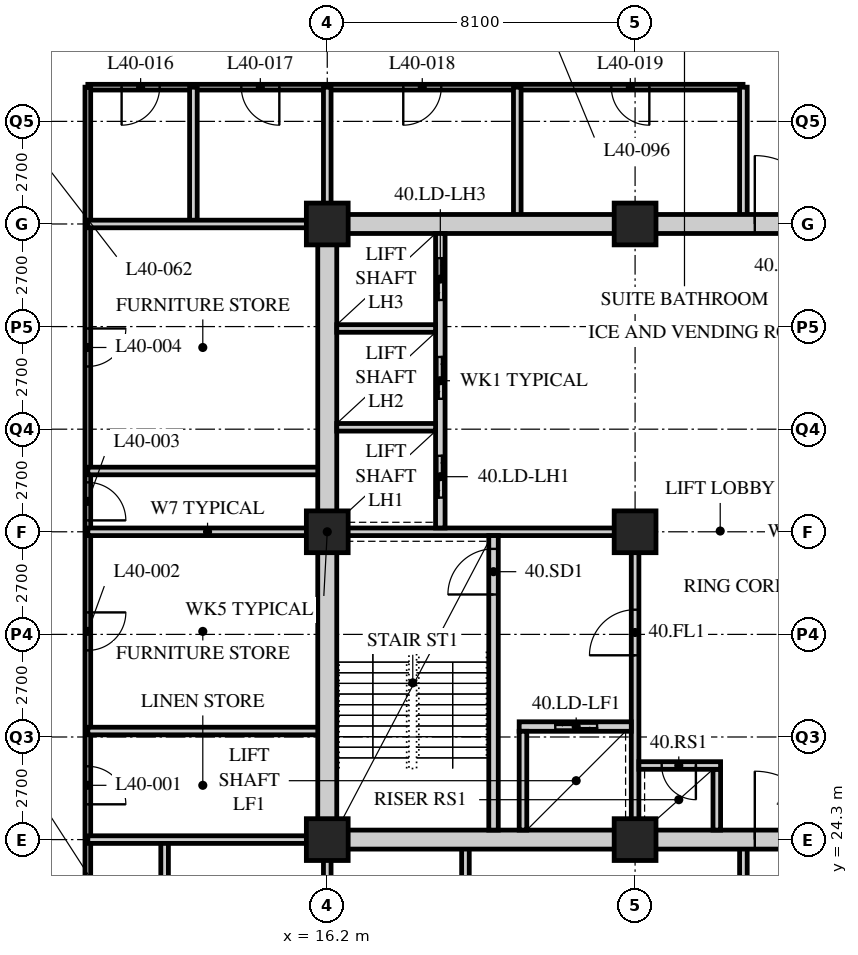
"""IFC4 building model, lengths in metres.
Left out: names, types, materials, properties, quantities, classifications, styles, units other than length and angle.
Written with IfcOpenShell. Run it as: python <this file> out.ifc"""

import sys

from ifc_helpers import new_model, si_unit, direction, frame, frame_2d, origin, origin_2d, place, context, subcontext, project, spatial, rectangle, hollow_rectangle, extrude, element, fill, save


model = new_model("IFC4")
c1 = context("Model", 3, precision=1e-05, world=origin(), true_north=direction((0.0, 1.0)))
c2 = subcontext(c1, "Body", "Model", "MODEL_VIEW")
j1 = project(units=[si_unit("LENGTHUNIT", "METRE"), si_unit("PLANEANGLEUNIT", "RADIAN")], contexts=[c1])
p1 = place(None, origin())
s1 = spatial("IfcSite", under=j1, at=p1, CompositionType="ELEMENT")
p2 = place(p1, origin())
s2 = spatial("IfcBuilding", under=s1, at=p2, CompositionType="ELEMENT")
p3 = place(p2, frame((0.0, 0.0, 154.4)))
s3 = spatial("IfcBuildingStorey", under=s2, at=p3, CompositionType="ELEMENT", Elevation=154.4)
for number, where, z_axis, x_axis in (
    (1, (16.2, 24.3, 0.0), (0.0, 0.0, 1.0), (1.0, 0.0, 0.0)),
    (2, (16.2, 32.4, 0.0), (0.0, 0.0, 1.0), (1.0, 0.0, 0.0)),
    (3, (16.2, 40.5, 0.0), (0.0, 0.0, 1.0), (1.0, 0.0, 0.0)),
    (4, (24.3, 24.3, 0.0), (0.0, 0.0, 1.0), (1.0, 0.0, 0.0)),
    (5, (24.3, 32.4, 0.0), (0.0, 0.0, 1.0), (1.0, 0.0, 0.0)),
    (6, (24.3, 40.5, 0.0), (0.0, 0.0, 1.0), (1.0, 0.0, 0.0)),
):
    element("IfcColumn", number, at=place(p3, frame(where, z_axis=z_axis, x_axis=x_axis)), inside=s3, PredefinedType="COLUMN", context=c2, shape_type="SweptSolid", body=[
        extrude(hollow_rectangle(XDim=1.1, YDim=1.1, WallThickness=0.1, at=origin_2d()), origin(), (0.0, 0.0, 1.0), 3.4),
    ])
p4 = place(p3, frame((27.14, 44.1, 0.0), z_axis=(0.0, 0.0, 1.0), x_axis=(-1.0, 0.0, 0.0)))
e7 = element("IfcWall", 7, at=p4, inside=s3, PredefinedType="PARTITIONING", context=c2, shape_type="SweptSolid", body=[
    extrude(rectangle(XDim=17.24, YDim=0.15, at=frame_2d((8.62, 0.0))), origin(), (0.0, 0.0, 1.0), 3.15),
])
p5 = place(p4, frame((15.351, 0.0, 0.0)))
e8 = element("IfcOpeningElement", 8, at=p5, cuts=e7, PredefinedType="OPENING", context=c2, shape_type="SweptSolid", body=[
    extrude(rectangle(XDim=1.0, YDim=2.1, at=frame_2d((0.5, 1.05))), frame((0.0, 0.085, 0.0), z_axis=(0.0, -1.0, 0.0), x_axis=(1.0, 0.0, 0.0)), (0.0, 0.0, 1.0), 0.17),
])
p6 = place(p4, frame((12.201, 0.0, 0.0)))
e9 = element("IfcOpeningElement", 9, at=p6, cuts=e7, PredefinedType="OPENING", context=c2, shape_type="SweptSolid", body=[
    extrude(rectangle(XDim=1.0, YDim=2.1, at=frame_2d((0.5, 1.05))), frame((0.0, 0.085, 0.0), z_axis=(0.0, -1.0, 0.0), x_axis=(1.0, 0.0, 0.0)), (0.0, 0.0, 1.0), 0.17),
])
p7 = place(p4, frame((7.94, 0.0, 0.0)))
e10 = element("IfcOpeningElement", 10, at=p7, cuts=e7, PredefinedType="OPENING", context=c2, shape_type="SweptSolid", body=[
    extrude(rectangle(XDim=1.0, YDim=2.1, at=frame_2d((0.5, 1.05))), frame((0.0, 0.085, 0.0), z_axis=(0.0, -1.0, 0.0), x_axis=(1.0, 0.0, 0.0)), (0.0, 0.0, 1.0), 0.17),
])
p8 = place(p4, frame((2.465, 0.0, 0.0)))
e11 = element("IfcOpeningElement", 11, at=p8, cuts=e7, PredefinedType="OPENING", context=c2, shape_type="SweptSolid", body=[
    extrude(rectangle(XDim=1.0, YDim=2.1, at=frame_2d((0.5, 1.05))), frame((0.0, 0.085, 0.0), z_axis=(0.0, -1.0, 0.0), x_axis=(1.0, 0.0, 0.0)), (0.0, 0.0, 1.0), 0.17),
])
p9 = place(p3, frame((9.9, 44.1, 0.0), z_axis=(0.0, 0.0, 1.0), x_axis=(0.0, -1.0, 0.0)))
e12 = element("IfcWall", 12, at=p9, inside=s3, PredefinedType="PARTITIONING", context=c2, shape_type="SweptSolid", body=[
    extrude(rectangle(XDim=24.75, YDim=0.15, at=frame_2d((12.375, 0.0))), origin(), (0.0, 0.0, 1.0), 3.15),
])
p10 = place(p9, frame((17.871, 0.0, 0.0)))
e13 = element("IfcOpeningElement", 13, at=p10, cuts=e12, PredefinedType="OPENING", context=c2, shape_type="SweptSolid", body=[
    extrude(rectangle(XDim=1.0, YDim=2.1, at=frame_2d((0.5, 1.05))), frame((0.0, 0.085, 0.0), z_axis=(0.0, -1.0, 0.0), x_axis=(1.0, 0.0, 0.0)), (0.0, 0.0, 1.0), 0.17),
])
p11 = place(p9, frame((13.821, 0.0, 0.0)))
e14 = element("IfcOpeningElement", 14, at=p11, cuts=e12, PredefinedType="OPENING", context=c2, shape_type="SweptSolid", body=[
    extrude(rectangle(XDim=1.0, YDim=2.1, at=frame_2d((0.5, 1.05))), frame((0.0, 0.085, 0.0), z_axis=(0.0, -1.0, 0.0), x_axis=(1.0, 0.0, 0.0)), (0.0, 0.0, 1.0), 0.17),
])
p12 = place(p9, frame((10.4, 0.0, 0.0)))
e15 = element("IfcOpeningElement", 15, at=p12, cuts=e12, PredefinedType="OPENING", context=c2, shape_type="SweptSolid", body=[
    extrude(rectangle(XDim=1.0, YDim=2.1, at=frame_2d((0.5, 1.05))), frame((0.0, 0.085, 0.0), z_axis=(0.0, -1.0, 0.0), x_axis=(1.0, 0.0, 0.0)), (0.0, 0.0, 1.0), 0.17),
])
p13 = place(p9, frame((6.35, 0.0, 0.0)))
e16 = element("IfcOpeningElement", 16, at=p13, cuts=e12, PredefinedType="OPENING", context=c2, shape_type="SweptSolid", body=[
    extrude(rectangle(XDim=1.0, YDim=2.1, at=frame_2d((0.5, 1.05))), frame((0.0, 0.085, 0.0), z_axis=(0.0, -1.0, 0.0), x_axis=(1.0, 0.0, 0.0)), (0.0, 0.0, 1.0), 0.17),
])
for number, where, z_axis, x_axis in (
    (17, (9.9, 32.4, 0.0), (0.0, 0.0, 1.0), (1.0, 0.0, 0.0)),
    (18, (9.9, 27.157, 0.0), (0.0, 0.0, 1.0), (1.0, 0.0, 0.0)),
    (19, (9.9, 34.0, 0.0), (0.0, 0.0, 1.0), (1.0, 0.0, 0.0)),
):
    element("IfcWall", number, at=place(p3, frame(where, z_axis=z_axis, x_axis=x_axis)), inside=s3, PredefinedType="SOLIDWALL", context=c2, shape_type="SweptSolid", body=[
        extrude(rectangle(XDim=6.3, YDim=0.2, at=frame_2d((3.15, 0.0))), origin(), (0.0, 0.0, 1.0), 3.15),
    ])
p14 = place(p3, frame((16.2, 19.35, 0.0), z_axis=(0.0, 0.0, 1.0), x_axis=(0.0, 1.0, 0.0)))
e20 = element("IfcWall", 20, at=p14, inside=s3, PredefinedType="SOLIDWALL", context=c2, shape_type="SweptSolid", body=[
    extrude(rectangle(XDim=4.95, YDim=0.2, at=frame_2d((2.475, 0.0))), origin(), (0.0, 0.0, 1.0), 2.15),
])
for number, where, z_axis, x_axis in (
    (21, (11.92, 19.35, 0.0), (0.0, 0.0, 1.0), (0.0, 1.0, 0.0)),
    (22, (19.836, 19.35, 0.0), (0.0, 0.0, 1.0), (0.0, 1.0, 0.0)),
    (23, (27.15, 19.35, 0.0), (0.0, 0.0, 1.0), (0.0, 1.0, 0.0)),
):
    element("IfcWall", number, at=place(p3, frame(where, z_axis=z_axis, x_axis=x_axis)), inside=s3, PredefinedType="SOLIDWALL", context=c2, shape_type="SweptSolid", body=[
        extrude(rectangle(XDim=4.95, YDim=0.2, at=frame_2d((2.475, 0.0))), origin(), (0.0, 0.0, 1.0), 3.15),
    ])
p15 = place(p3, frame((16.2, 40.5, 0.0), z_axis=(0.0, 0.0, 1.0), x_axis=(0.0, 1.0, 0.0)))
e24 = element("IfcWall", 24, at=p15, inside=s3, PredefinedType="SOLIDWALL", context=c2, shape_type="SweptSolid", body=[
    extrude(rectangle(XDim=3.6, YDim=0.2, at=frame_2d((1.8, 0.0))), origin(), (0.0, 0.0, 1.0), 2.15),
])
for number, where, z_axis, x_axis in (
    (25, (12.678, 44.1, 0.0), (0.0, 0.0, 1.0), (0.0, -1.0, 0.0)),
    (26, (21.2, 44.1, 0.0), (0.0, 0.0, 1.0), (0.0, -1.0, 0.0)),
    (27, (27.15, 40.5, 0.0), (0.0, 0.0, 1.0), (0.0, 1.0, 0.0)),
):
    element("IfcWall", number, at=place(p3, frame(where, z_axis=z_axis, x_axis=x_axis)), inside=s3, PredefinedType="SOLIDWALL", context=c2, shape_type="SweptSolid", body=[
        extrude(rectangle(XDim=3.6, YDim=0.2, at=frame_2d((1.8, 0.0))), origin(), (0.0, 0.0, 1.0), 3.15),
    ])
for number, where, z_axis, x_axis in (
    (28, (9.9, 24.3, 0.0), (0.0, 0.0, 1.0), (1.0, 0.0, 0.0)),
    (29, (9.9, 40.5, 0.0), (0.0, 0.0, 1.0), (1.0, 0.0, 0.0)),
):
    element("IfcWall", number, at=place(p3, frame(where, z_axis=z_axis, x_axis=x_axis)), inside=s3, PredefinedType="SOLIDWALL", context=c2, shape_type="SweptSolid", body=[
        extrude(rectangle(XDim=6.3, YDim=0.2, at=frame_2d((3.15, 0.0))), origin(), (0.0, 0.0, 1.0), 3.15),
    ])
p16 = place(p3, frame((15.95, 24.3, 0.0), z_axis=(0.0, 0.0, 1.0), x_axis=(1.0, 0.0, 0.0)))
e30 = element("IfcWall", 30, at=p16, inside=s3, PredefinedType="SOLIDWALL", context=c2, shape_type="SweptSolid", body=[
    extrude(rectangle(XDim=8.35, YDim=0.5, at=frame_2d((4.175, 0.0))), origin(), (0.0, 0.0, 1.0), 2.38),
])
p17 = place(p3, frame((24.3, 24.3, 0.0), z_axis=(0.0, 0.0, 1.0), x_axis=(1.0, 0.0, 0.0)))
e31 = element("IfcWall", 31, at=p17, inside=s3, PredefinedType="SOLIDWALL", context=c2, shape_type="SweptSolid", body=[
    extrude(rectangle(XDim=8.1, YDim=0.5, at=frame_2d((4.05, 0.0))), origin(), (0.0, 0.0, 1.0), 2.5),
])
p18 = place(p17, frame((3.15, 0.0, 0.0)))
e32 = element("IfcOpeningElement", 32, at=p18, cuts=e31, PredefinedType="OPENING", context=c2, shape_type="SweptSolid", body=[
    extrude(rectangle(XDim=1.8, YDim=2.4, at=frame_2d((0.9, 1.2))), frame((0.0, 0.26, 0.0), z_axis=(0.0, -1.0, 0.0), x_axis=(1.0, 0.0, 0.0)), (0.0, 0.0, 1.0), 0.52),
])
p19 = place(p3, frame((15.95, 40.5, 0.0), z_axis=(0.0, 0.0, 1.0), x_axis=(1.0, 0.0, 0.0)))
e33 = element("IfcWall", 33, at=p19, inside=s3, PredefinedType="SOLIDWALL", context=c2, shape_type="SweptSolid", body=[
    extrude(rectangle(XDim=8.35, YDim=0.5, at=frame_2d((4.175, 0.0))), origin(), (0.0, 0.0, 1.0), 2.38),
])
p20 = place(p3, frame((24.3, 40.5, 0.0), z_axis=(0.0, 0.0, 1.0), x_axis=(1.0, 0.0, 0.0)))
e34 = element("IfcWall", 34, at=p20, inside=s3, PredefinedType="SOLIDWALL", context=c2, shape_type="SweptSolid", body=[
    extrude(rectangle(XDim=8.1, YDim=0.5, at=frame_2d((4.05, 0.0))), origin(), (0.0, 0.0, 1.0), 2.5),
])
p21 = place(p20, frame((3.15, 0.0, 0.0)))
e35 = element("IfcOpeningElement", 35, at=p21, cuts=e34, PredefinedType="OPENING", context=c2, shape_type="SweptSolid", body=[
    extrude(rectangle(XDim=1.8, YDim=2.4, at=frame_2d((0.9, 1.2))), frame((0.0, 0.26, 0.0), z_axis=(0.0, -1.0, 0.0), x_axis=(1.0, 0.0, 0.0)), (0.0, 0.0, 1.0), 0.52),
])
p22 = place(p3, frame((16.2, 24.55, 0.0), z_axis=(0.0, 0.0, 1.0), x_axis=(0.0, 1.0, 0.0)))
e36 = element("IfcWall", 36, at=p22, inside=s3, PredefinedType="SOLIDWALL", context=c2, shape_type="SweptSolid", body=[
    extrude(rectangle(XDim=15.7, YDim=0.5, at=frame_2d((7.85, 0.0))), origin(), (0.0, 0.0, 1.0), 2.15),
])
p23 = place(p3, frame((16.45, 32.4, 0.0), z_axis=(0.0, 0.0, 1.0), x_axis=(1.0, 0.0, 0.0)))
e37 = element("IfcWall", 37, at=p23, inside=s3, PredefinedType="SOLIDWALL", context=c2, shape_type="SweptSolid", body=[
    extrude(rectangle(XDim=7.95, YDim=0.2, at=frame_2d((3.975, 0.0))), origin(), (0.0, 0.0, 1.0), 2.388),
])
p24 = place(p3, frame((24.3, 24.55, 0.0), z_axis=(0.0, 0.0, 1.0), x_axis=(0.0, 1.0, 0.0)))
e38 = element("IfcWall", 38, at=p24, inside=s3, PredefinedType="SOLIDWALL", context=c2, shape_type="SweptSolid", body=[
    extrude(rectangle(XDim=7.75, YDim=0.2, at=frame_2d((3.875, 0.0))), origin(), (0.0, 0.0, 1.0), 2.388),
])
p25 = place(p24, frame((4.6, 0.0, 0.0)))
e39 = element("IfcOpeningElement", 39, at=p25, cuts=e38, PredefinedType="OPENING", context=c2, shape_type="SweptSolid", body=[
    extrude(rectangle(XDim=1.2, YDim=2.1, at=frame_2d((0.6, 1.05))), frame((0.0, 0.11, 0.0), z_axis=(0.0, -1.0, 0.0), x_axis=(1.0, 0.0, 0.0)), (0.0, 0.0, 1.0), 0.22),
])
p26 = place(p3, frame((20.575, 24.55, 0.0), z_axis=(0.0, 0.0, 1.0), x_axis=(0.0, 1.0, 0.0)))
e40 = element("IfcWall", 40, at=p26, inside=s3, PredefinedType="SOLIDWALL", context=c2, shape_type="SweptSolid", body=[
    extrude(rectangle(XDim=7.75, YDim=0.25, at=frame_2d((3.875, 0.0))), origin(), (0.0, 0.0, 1.0), 3.15),
])
p27 = place(p26, frame((6.2, 0.0, 0.0)))
e41 = element("IfcOpeningElement", 41, at=p27, cuts=e40, PredefinedType="OPENING", context=c2, shape_type="SweptSolid", body=[
    extrude(rectangle(XDim=1.2, YDim=2.1, at=frame_2d((0.6, 1.05))), frame((0.0, 0.135, 0.0), z_axis=(0.0, -1.0, 0.0), x_axis=(1.0, 0.0, 0.0)), (0.0, 0.0, 1.0), 0.27),
])
p28 = place(p3, frame((21.25, 27.275, 0.0), z_axis=(0.0, 0.0, 1.0), x_axis=(1.0, 0.0, 0.0)))
e42 = element("IfcWall", 42, at=p28, inside=s3, PredefinedType="SOLIDWALL", context=c2, shape_type="SweptSolid", body=[
    extrude(rectangle(XDim=2.95, YDim=0.25, at=frame_2d((1.475, 0.0))), origin(), (0.0, 0.0, 1.0), 3.15),
])
p29 = place(p28, frame((0.95, 0.0, 0.0)))
e43 = element("IfcOpeningElement", 43, at=p29, cuts=e42, PredefinedType="OPENING", context=c2, shape_type="SweptSolid", body=[
    extrude(rectangle(XDim=1.1, YDim=2.4, at=frame_2d((0.55, 1.2))), frame((0.0, 0.135, 0.0), z_axis=(0.0, -1.0, 0.0), x_axis=(1.0, 0.0, 0.0)), (0.0, 0.0, 1.0), 0.27),
])
p30 = place(p3, frame((21.35, 24.55, 0.0), z_axis=(0.0, 0.0, 1.0), x_axis=(0.0, 1.0, 0.0)))
e44 = element("IfcWall", 44, at=p30, inside=s3, PredefinedType="SOLIDWALL", context=c2, shape_type="SweptSolid", body=[
    extrude(rectangle(XDim=2.6, YDim=0.2, at=frame_2d((1.3, 0.0))), origin(), (0.0, 0.0, 1.0), 3.15),
])
p31 = place(p3, frame((19.175, 32.5, 0.0), z_axis=(0.0, 0.0, 1.0), x_axis=(0.0, 1.0, 0.0)))
e45 = element("IfcWall", 45, at=p31, inside=s3, PredefinedType="SOLIDWALL", context=c2, shape_type="SweptSolid", body=[
    extrude(rectangle(XDim=7.75, YDim=0.25, at=frame_2d((3.875, 0.0))), origin(), (0.0, 0.0, 1.0), 3.15),
])
p32 = place(p31, frame((0.8, 0.0, 0.0)))
e46 = element("IfcOpeningElement", 46, at=p32, cuts=e45, PredefinedType="OPENING", context=c2, shape_type="SweptSolid", body=[
    extrude(rectangle(XDim=1.1, YDim=2.4, at=frame_2d((0.55, 1.2))), frame((0.0, 0.135, 0.0), z_axis=(0.0, -1.0, 0.0), x_axis=(1.0, 0.0, 0.0)), (0.0, 0.0, 1.0), 0.27),
])
p33 = place(p31, frame((3.4, 0.0, 0.0)))
e47 = element("IfcOpeningElement", 47, at=p33, cuts=e45, PredefinedType="OPENING", context=c2, shape_type="SweptSolid", body=[
    extrude(rectangle(XDim=1.1, YDim=2.4, at=frame_2d((0.55, 1.2))), frame((0.0, 0.135, 0.0), z_axis=(0.0, -1.0, 0.0), x_axis=(1.0, 0.0, 0.0)), (0.0, 0.0, 1.0), 0.27),
])
p34 = place(p31, frame((6.0, 0.0, 0.0)))
e48 = element("IfcOpeningElement", 48, at=p34, cuts=e45, PredefinedType="OPENING", context=c2, shape_type="SweptSolid", body=[
    extrude(rectangle(XDim=1.1, YDim=2.4, at=frame_2d((0.55, 1.2))), frame((0.0, 0.135, 0.0), z_axis=(0.0, -1.0, 0.0), x_axis=(1.0, 0.0, 0.0)), (0.0, 0.0, 1.0), 0.27),
])
for number, where, z_axis, x_axis in (
    (49, (16.45, 35.15, 0.0), (0.0, 0.0, 1.0), (1.0, 0.0, 0.0)),
    (50, (16.45, 37.75, 0.0), (0.0, 0.0, 1.0), (1.0, 0.0, 0.0)),
):
    element("IfcWall", number, at=place(p3, frame(where, z_axis=z_axis, x_axis=x_axis)), inside=s3, PredefinedType="SOLIDWALL", context=c2, shape_type="SweptSolid", body=[
        extrude(rectangle(XDim=2.6, YDim=0.2, at=frame_2d((1.3, 0.0))), origin(), (0.0, 0.0, 1.0), 3.15),
    ])
p35 = place(p3, frame((26.45, 24.55, 0.0), z_axis=(0.0, 0.0, 1.0), x_axis=(0.0, 1.0, 0.0)))
e51 = element("IfcWall", 51, at=p35, inside=s3, PredefinedType="SOLIDWALL", context=c2, shape_type="SweptSolid", body=[
    extrude(rectangle(XDim=1.6, YDim=0.2, at=frame_2d((0.8, 0.0))), origin(), (0.0, 0.0, 1.0), 3.15),
])
p36 = place(p3, frame((24.4, 26.25, 0.0), z_axis=(0.0, 0.0, 1.0), x_axis=(1.0, 0.0, 0.0)))
e52 = element("IfcWall", 52, at=p36, inside=s3, PredefinedType="SOLIDWALL", context=c2, shape_type="SweptSolid", body=[
    extrude(rectangle(XDim=2.15, YDim=0.2, at=frame_2d((1.075, 0.0))), origin(), (0.0, 0.0, 1.0), 3.15),
])
p37 = place(p36, frame((0.6, 0.0, 0.0)))
e53 = element("IfcOpeningElement", 53, at=p37, cuts=e52, PredefinedType="OPENING", context=c2, shape_type="SweptSolid", body=[
    extrude(rectangle(XDim=0.9, YDim=2.1, at=frame_2d((0.45, 1.05))), frame((0.0, 0.11, 0.0), z_axis=(0.0, -1.0, 0.0), x_axis=(1.0, 0.0, 0.0)), (0.0, 0.0, 1.0), 0.22),
])
p38 = place(p10, origin())
e54 = element("IfcDoor", 54, at=p38, inside=s3, OperationType="SINGLE_SWING_RIGHT", PredefinedType="DOOR", context=c2, shape_type="SweptSolid", body=[
    extrude(rectangle(XDim=1.0, YDim=2.1, at=frame_2d((0.5, 1.05))), frame((0.0, 0.025, 0.0), z_axis=(0.0, -1.0, 0.0), x_axis=(1.0, 0.0, 0.0)), (0.0, 0.0, 1.0), 0.05),
])
fill(e13, e54)
p39 = place(p11, origin())
e55 = element("IfcDoor", 55, at=p39, inside=s3, OperationType="SINGLE_SWING_LEFT", PredefinedType="DOOR", context=c2, shape_type="SweptSolid", body=[
    extrude(rectangle(XDim=1.0, YDim=2.1, at=frame_2d((0.5, 1.05))), frame((0.0, 0.025, 0.0), z_axis=(0.0, -1.0, 0.0), x_axis=(1.0, 0.0, 0.0)), (0.0, 0.0, 1.0), 0.05),
])
fill(e14, e55)
p40 = place(p12, origin())
e56 = element("IfcDoor", 56, at=p40, inside=s3, OperationType="SINGLE_SWING_RIGHT", PredefinedType="DOOR", context=c2, shape_type="SweptSolid", body=[
    extrude(rectangle(XDim=1.0, YDim=2.1, at=frame_2d((0.5, 1.05))), frame((0.0, 0.025, 0.0), z_axis=(0.0, -1.0, 0.0), x_axis=(1.0, 0.0, 0.0)), (0.0, 0.0, 1.0), 0.05),
])
fill(e15, e56)
p41 = place(p13, origin())
e57 = element("IfcDoor", 57, at=p41, inside=s3, OperationType="SINGLE_SWING_LEFT", PredefinedType="DOOR", context=c2, shape_type="SweptSolid", body=[
    extrude(rectangle(XDim=1.0, YDim=2.1, at=frame_2d((0.5, 1.05))), frame((0.0, 0.025, 0.0), z_axis=(0.0, -1.0, 0.0), x_axis=(1.0, 0.0, 0.0)), (0.0, 0.0, 1.0), 0.05),
])
fill(e16, e57)
p42 = place(p5, origin())
e58 = element("IfcDoor", 58, at=p42, inside=s3, OperationType="SINGLE_SWING_RIGHT", PredefinedType="DOOR", context=c2, shape_type="SweptSolid", body=[
    extrude(rectangle(XDim=1.0, YDim=2.1, at=frame_2d((0.5, 1.05))), frame((0.0, 0.025, 0.0), z_axis=(0.0, -1.0, 0.0), x_axis=(1.0, 0.0, 0.0)), (0.0, 0.0, 1.0), 0.05),
])
fill(e8, e58)
p43 = place(p6, origin())
e59 = element("IfcDoor", 59, at=p43, inside=s3, OperationType="SINGLE_SWING_LEFT", PredefinedType="DOOR", context=c2, shape_type="SweptSolid", body=[
    extrude(rectangle(XDim=1.0, YDim=2.1, at=frame_2d((0.5, 1.05))), frame((0.0, 0.025, 0.0), z_axis=(0.0, -1.0, 0.0), x_axis=(1.0, 0.0, 0.0)), (0.0, 0.0, 1.0), 0.05),
])
fill(e9, e59)
p44 = place(p7, origin())
e60 = element("IfcDoor", 60, at=p44, inside=s3, OperationType="SINGLE_SWING_RIGHT", PredefinedType="DOOR", context=c2, shape_type="SweptSolid", body=[
    extrude(rectangle(XDim=1.0, YDim=2.1, at=frame_2d((0.5, 1.05))), frame((0.0, 0.025, 0.0), z_axis=(0.0, -1.0, 0.0), x_axis=(1.0, 0.0, 0.0)), (0.0, 0.0, 1.0), 0.05),
])
fill(e10, e60)
p45 = place(p8, origin())
e61 = element("IfcDoor", 61, at=p45, inside=s3, OperationType="SINGLE_SWING_LEFT", PredefinedType="DOOR", context=c2, shape_type="SweptSolid", body=[
    extrude(rectangle(XDim=1.0, YDim=2.1, at=frame_2d((0.5, 1.05))), frame((0.0, 0.025, 0.0), z_axis=(0.0, -1.0, 0.0), x_axis=(1.0, 0.0, 0.0)), (0.0, 0.0, 1.0), 0.05),
])
fill(e11, e61)
p46 = place(p27, origin())
e62 = element("IfcDoor", 62, at=p46, inside=s3, OperationType="SINGLE_SWING_LEFT", PredefinedType="DOOR", context=c2, shape_type="SweptSolid", body=[
    extrude(rectangle(XDim=1.2, YDim=2.1, at=frame_2d((0.6, 1.05))), frame((0.0, 0.025, 0.0), z_axis=(0.0, -1.0, 0.0), x_axis=(1.0, 0.0, 0.0)), (0.0, 0.0, 1.0), 0.05),
])
fill(e41, e62)
p47 = place(p25, origin())
e63 = element("IfcDoor", 63, at=p47, inside=s3, OperationType="SINGLE_SWING_LEFT", PredefinedType="DOOR", context=c2, shape_type="SweptSolid", body=[
    extrude(rectangle(XDim=1.2, YDim=2.1, at=frame_2d((0.6, 1.05))), frame((0.0, 0.025, 0.0), z_axis=(0.0, -1.0, 0.0), x_axis=(1.0, 0.0, 0.0)), (0.0, 0.0, 1.0), 0.05),
])
fill(e39, e63)
p48 = place(p37, origin())
e64 = element("IfcDoor", 64, at=p48, inside=s3, OperationType="SINGLE_SWING_LEFT", PredefinedType="DOOR", context=c2, shape_type="SweptSolid", body=[
    extrude(rectangle(XDim=0.9, YDim=2.1, at=frame_2d((0.45, 1.05))), frame((0.0, 0.025, 0.0), z_axis=(0.0, -1.0, 0.0), x_axis=(1.0, 0.0, 0.0)), (0.0, 0.0, 1.0), 0.05),
])
fill(e53, e64)
p49 = place(p32, origin())
e65 = element("IfcDoor", 65, at=p49, inside=s3, OperationType="DOUBLE_DOOR_SLIDING", PredefinedType="DOOR", context=c2, shape_type="SweptSolid", body=[
    extrude(rectangle(XDim=1.1, YDim=2.4, at=frame_2d((0.55, 1.2))), frame((0.0, 0.025, 0.0), z_axis=(0.0, -1.0, 0.0), x_axis=(1.0, 0.0, 0.0)), (0.0, 0.0, 1.0), 0.05),
])
fill(e46, e65)
p50 = place(p33, origin())
e66 = element("IfcDoor", 66, at=p50, inside=s3, OperationType="DOUBLE_DOOR_SLIDING", PredefinedType="DOOR", context=c2, shape_type="SweptSolid", body=[
    extrude(rectangle(XDim=1.1, YDim=2.4, at=frame_2d((0.55, 1.2))), frame((0.0, 0.025, 0.0), z_axis=(0.0, -1.0, 0.0), x_axis=(1.0, 0.0, 0.0)), (0.0, 0.0, 1.0), 0.05),
])
fill(e47, e66)
p51 = place(p34, origin())
e67 = element("IfcDoor", 67, at=p51, inside=s3, OperationType="DOUBLE_DOOR_SLIDING", PredefinedType="DOOR", context=c2, shape_type="SweptSolid", body=[
    extrude(rectangle(XDim=1.1, YDim=2.4, at=frame_2d((0.55, 1.2))), frame((0.0, 0.025, 0.0), z_axis=(0.0, -1.0, 0.0), x_axis=(1.0, 0.0, 0.0)), (0.0, 0.0, 1.0), 0.05),
])
fill(e48, e67)
p52 = place(p29, origin())
e68 = element("IfcDoor", 68, at=p52, inside=s3, OperationType="DOUBLE_DOOR_SLIDING", PredefinedType="DOOR", context=c2, shape_type="SweptSolid", body=[
    extrude(rectangle(XDim=1.1, YDim=2.4, at=frame_2d((0.55, 1.2))), frame((0.0, 0.025, 0.0), z_axis=(0.0, -1.0, 0.0), x_axis=(1.0, 0.0, 0.0)), (0.0, 0.0, 1.0), 0.05),
])
fill(e43, e68)
p53 = place(p18, origin())
e69 = element("IfcDoor", 69, at=p53, inside=s3, OperationType="DOUBLE_DOOR_SINGLE_SWING", PredefinedType="DOOR", context=c2, shape_type="SweptSolid", body=[
    extrude(rectangle(XDim=1.8, YDim=2.4, at=frame_2d((0.9, 1.2))), frame((0.0, 0.025, 0.0), z_axis=(0.0, -1.0, 0.0), x_axis=(1.0, 0.0, 0.0)), (0.0, 0.0, 1.0), 0.05),
])
fill(e32, e69)
p54 = place(p21, origin())
e70 = element("IfcDoor", 70, at=p54, inside=s3, OperationType="DOUBLE_DOOR_SINGLE_SWING", PredefinedType="DOOR", context=c2, shape_type="SweptSolid", body=[
    extrude(rectangle(XDim=1.8, YDim=2.4, at=frame_2d((0.9, 1.2))), frame((0.0, 0.025, 0.0), z_axis=(0.0, -1.0, 0.0), x_axis=(1.0, 0.0, 0.0)), (0.0, 0.0, 1.0), 0.05),
])
fill(e35, e70)
save(model, sys.argv[1])
